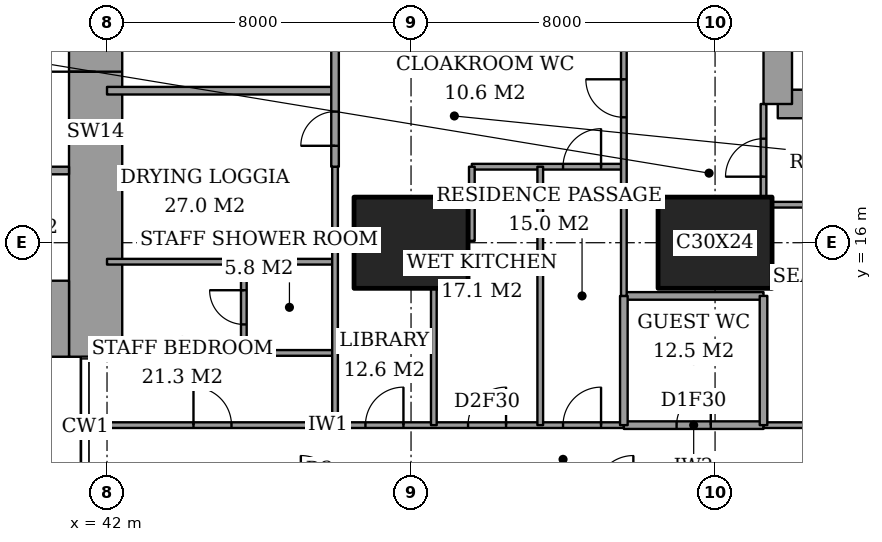
"""IFC4 building model, lengths in metres.
Left out: names, types, materials, properties, quantities, classifications, styles, units other than length and angle.
Written with IfcOpenShell. Run it as: python <this file> out.ifc"""

import sys

from ifc_helpers import new_model, si_unit, direction, frame, frame_2d, origin, origin_2d, place, context, subcontext, project, spatial, rectangle, extrude, element, fill, save


model = new_model("IFC4")
c1 = context("Model", 3, precision=1e-05, world=origin(), true_north=direction((0.0, 1.0)))
c2 = subcontext(c1, "Body", "Model", "MODEL_VIEW")
j1 = project(units=[si_unit("LENGTHUNIT", "METRE"), si_unit("PLANEANGLEUNIT", "RADIAN")], contexts=[c1])
p1 = place(None, origin())
s1 = spatial("IfcSite", under=j1, at=p1, CompositionType="ELEMENT")
p2 = place(p1, origin())
s2 = spatial("IfcBuilding", under=s1, at=p2, CompositionType="ELEMENT")
p3 = place(p2, frame((0.0, 0.0, 207.4)))
s3 = spatial("IfcBuildingStorey", under=s2, at=p3, CompositionType="ELEMENT", Elevation=207.4)
for number, where, z_axis, x_axis in (
    (1, (50.0, 16.0, 0.0), (0.0, 0.0, 1.0), (1.0, 0.0, 0.0)),
    (2, (58.0, 16.0, 0.0), (0.0, 0.0, 1.0), (1.0, 0.0, 0.0)),
):
    element("IfcColumn", number, at=place(p3, frame(where, z_axis=z_axis, x_axis=x_axis)), inside=s3, PredefinedType="COLUMN", context=c2, shape_type="SweptSolid", body=[
        extrude(rectangle(XDim=3.0, YDim=2.4, at=origin_2d()), origin(), (0.0, 0.0, 1.0), 3.6),
    ])
p4 = place(p3, frame((37.85, 14.0, 0.0), z_axis=(0.0, 0.0, 1.0), x_axis=(1.0, 0.0, 0.0)))
e3 = element("IfcWall", 3, at=p4, inside=s3, PredefinedType="SHEAR", context=c2, shape_type="SweptSolid", body=[
    extrude(rectangle(XDim=3.15, YDim=2.0, at=frame_2d((1.575, 0.0))), origin(), (0.0, 0.0, 1.0), 3.6),
])
p5 = place(p3, frame((41.7, 13.0, 0.0), z_axis=(0.0, 0.0, 1.0), x_axis=(0.0, 1.0, 0.0)))
e4 = element("IfcWall", 4, at=p5, inside=s3, PredefinedType="SHEAR", context=c2, shape_type="SweptSolid", body=[
    extrude(rectangle(XDim=11.85, YDim=1.4, at=frame_2d((5.925, 0.0))), origin(), (0.0, 0.0, 1.0), 3.6),
])
p6 = place(p5, frame((7.5, 0.0, 0.0)))
e5 = element("IfcOpeningElement", 5, at=p6, cuts=e4, PredefinedType="OPENING", context=c2, shape_type="SweptSolid", body=[
    extrude(rectangle(XDim=1.8, YDim=2.4, at=frame_2d((0.9, 1.2))), frame((0.0, 0.71, 0.0), z_axis=(0.0, -1.0, 0.0), x_axis=(1.0, 0.0, 0.0)), (0.0, 0.0, 1.0), 1.42),
])
p7 = place(p3, frame((59.65, 19.65, 0.0), z_axis=(0.0, 0.0, 1.0), x_axis=(1.0, 0.0, 0.0)))
e6 = element("IfcWall", 6, at=p7, inside=s3, PredefinedType="SHEAR", context=c2, shape_type="SweptSolid", body=[
    extrude(rectangle(XDim=4.45, YDim=0.75, at=frame_2d((2.225, 0.0))), origin(), (0.0, 0.0, 1.0), 3.6),
])
p8 = place(p3, frame((59.65, 28.35, 0.0), z_axis=(0.0, 0.0, 1.0), x_axis=(0.0, -1.0, 0.0)))
e7 = element("IfcWall", 7, at=p8, inside=s3, PredefinedType="SHEAR", context=c2, shape_type="SweptSolid", body=[
    extrude(rectangle(XDim=8.7, YDim=0.75, at=frame_2d((4.35, 0.0))), origin(), (0.0, 0.0, 1.0), 3.6),
])
p9 = place(p8, frame((0.975, 0.0, 0.0)))
e8 = element("IfcOpeningElement", 8, at=p9, cuts=e7, PredefinedType="OPENING", context=c2, shape_type="SweptSolid", body=[
    extrude(rectangle(XDim=1.0, YDim=2.1, at=frame_2d((0.5, 1.05))), frame((0.0, 0.385, 0.0), z_axis=(0.0, -1.0, 0.0), x_axis=(1.0, 0.0, 0.0)), (0.0, 0.0, 1.0), 0.77),
])
p10 = place(p3, frame((55.6, 11.2, 0.0), z_axis=(0.0, 0.0, 1.0), x_axis=(1.0, 0.0, 0.0)))
e9 = element("IfcWall", 9, at=p10, inside=s3, PredefinedType="PARTITIONING", context=c2, shape_type="SweptSolid", body=[
    extrude(rectangle(XDim=3.675, YDim=0.2, at=frame_2d((1.837, 0.0))), origin(), (0.0, 0.0, 1.0), 3.35),
])
p11 = place(p10, frame((1.387, 0.0, 0.0)))
e10 = element("IfcOpeningElement", 10, at=p11, cuts=e9, PredefinedType="OPENING", context=c2, shape_type="SweptSolid", body=[
    extrude(rectangle(XDim=0.9, YDim=2.1, at=frame_2d((0.45, 1.05))), frame((0.0, 0.11, 0.0), z_axis=(0.0, -1.0, 0.0), x_axis=(1.0, 0.0, 0.0)), (0.0, 0.0, 1.0), 0.22),
])
p12 = place(p3, frame((41.439, 11.2, 0.0), z_axis=(0.0, 0.0, 1.0), x_axis=(1.0, 0.0, 0.0)))
e11 = element("IfcWall", 11, at=p12, inside=s3, PredefinedType="PARTITIONING", context=c2, shape_type="SweptSolid", body=[
    extrude(rectangle(XDim=14.161, YDim=0.15, at=frame_2d((7.081, 0.0))), origin(), (0.0, 0.0, 1.0), 3.35),
])
p13 = place(p12, frame((12.561, 0.0, 0.0)))
e12 = element("IfcOpeningElement", 12, at=p13, cuts=e11, PredefinedType="OPENING", context=c2, shape_type="SweptSolid", body=[
    extrude(rectangle(XDim=1.0, YDim=2.1, at=frame_2d((0.5, 1.05))), frame((0.0, 0.085, 0.0), z_axis=(0.0, -1.0, 0.0), x_axis=(1.0, 0.0, 0.0)), (0.0, 0.0, 1.0), 0.17),
])
p14 = place(p12, frame((10.061, 0.0, 0.0)))
e13 = element("IfcOpeningElement", 13, at=p14, cuts=e11, PredefinedType="OPENING", context=c2, shape_type="SweptSolid", body=[
    extrude(rectangle(XDim=1.0, YDim=2.1, at=frame_2d((0.5, 1.05))), frame((0.0, 0.085, 0.0), z_axis=(0.0, -1.0, 0.0), x_axis=(1.0, 0.0, 0.0)), (0.0, 0.0, 1.0), 0.17),
])
p15 = place(p12, frame((7.361, 0.0, 0.0)))
e14 = element("IfcOpeningElement", 14, at=p15, cuts=e11, PredefinedType="OPENING", context=c2, shape_type="SweptSolid", body=[
    extrude(rectangle(XDim=1.0, YDim=2.1, at=frame_2d((0.5, 1.05))), frame((0.0, 0.085, 0.0), z_axis=(0.0, -1.0, 0.0), x_axis=(1.0, 0.0, 0.0)), (0.0, 0.0, 1.0), 0.17),
])
p16 = place(p12, frame((2.836, 0.0, 0.0)))
e15 = element("IfcOpeningElement", 15, at=p16, cuts=e11, PredefinedType="OPENING", context=c2, shape_type="SweptSolid", body=[
    extrude(rectangle(XDim=1.0, YDim=2.1, at=frame_2d((0.5, 1.05))), frame((0.0, 0.085, 0.0), z_axis=(0.0, -1.0, 0.0), x_axis=(1.0, 0.0, 0.0)), (0.0, 0.0, 1.0), 0.17),
])
p17 = place(p3, frame((59.275, 11.2, 0.0), z_axis=(0.0, 0.0, 1.0), x_axis=(1.0, 0.0, 0.0)))
e16 = element("IfcWall", 16, at=p17, inside=s3, PredefinedType="PARTITIONING", context=c2, shape_type="SweptSolid", body=[
    extrude(rectangle(XDim=7.175, YDim=0.15, at=frame_2d((3.587, 0.0))), origin(), (0.0, 0.0, 1.0), 3.35),
])
p18 = place(p17, frame((3.087, 0.0, 0.0)))
e17 = element("IfcOpeningElement", 17, at=p18, cuts=e16, PredefinedType="OPENING", context=c2, shape_type="SweptSolid", body=[
    extrude(rectangle(XDim=1.0, YDim=2.1, at=frame_2d((0.5, 1.05))), frame((0.0, 0.085, 0.0), z_axis=(0.0, -1.0, 0.0), x_axis=(1.0, 0.0, 0.0)), (0.0, 0.0, 1.0), 0.17),
])
p19 = place(p3, frame((45.6, 13.1, 0.0), z_axis=(0.0, 0.0, 1.0), x_axis=(1.0, 0.0, 0.0)))
e18 = element("IfcWall", 18, at=p19, inside=s3, PredefinedType="PARTITIONING", context=c2, shape_type="SweptSolid", body=[
    extrude(rectangle(XDim=2.4, YDim=0.15, at=frame_2d((1.2, 0.0))), origin(), (0.0, 0.0, 1.0), 3.35),
])
p20 = place(p3, frame((55.6, 14.6, 0.0), z_axis=(0.0, 0.0, 1.0), x_axis=(1.0, 0.0, 0.0)))
e19 = element("IfcWall", 19, at=p20, inside=s3, PredefinedType="PARTITIONING", context=c2, shape_type="SweptSolid", body=[
    extrude(rectangle(XDim=3.675, YDim=0.2, at=frame_2d((1.837, 0.0))), origin(), (0.0, 0.0, 1.0), 3.35),
])
p21 = place(p3, frame((42.0, 15.5, 0.0), z_axis=(0.0, 0.0, 1.0), x_axis=(1.0, 0.0, 0.0)))
e20 = element("IfcWall", 20, at=p21, inside=s3, PredefinedType="PARTITIONING", context=c2, shape_type="SweptSolid", body=[
    extrude(rectangle(XDim=6.0, YDim=0.15, at=frame_2d((3.0, 0.0))), origin(), (0.0, 0.0, 1.0), 3.35),
])
p22 = place(p3, frame((48.0, 16.05, 0.0), z_axis=(0.0, 0.0, 1.0), x_axis=(1.0, 0.0, 0.0)))
e21 = element("IfcWall", 21, at=p22, inside=s3, PredefinedType="PARTITIONING", context=c2, shape_type="SweptSolid", body=[
    extrude(rectangle(XDim=0.5, YDim=0.15, at=frame_2d((0.25, 0.0))), origin(), (0.0, 0.0, 1.0), 2.634),
])
p23 = place(p3, frame((59.5, 17.0, 0.0), z_axis=(0.0, 0.0, 1.0), x_axis=(1.0, 0.0, 0.0)))
e22 = element("IfcWall", 22, at=p23, inside=s3, PredefinedType="PARTITIONING", context=c2, shape_type="SweptSolid", body=[
    extrude(rectangle(XDim=6.95, YDim=0.15, at=frame_2d((3.475, 0.0))), origin(), (0.0, 0.0, 1.0), 3.35),
])
p24 = place(p3, frame((51.6, 18.0, 0.0), z_axis=(0.0, 0.0, 1.0), x_axis=(1.0, 0.0, 0.0)))
e23 = element("IfcWall", 23, at=p24, inside=s3, PredefinedType="PARTITIONING", context=c2, shape_type="SweptSolid", body=[
    extrude(rectangle(XDim=4.0, YDim=0.15, at=frame_2d((2.0, 0.0))), origin(), (0.0, 0.0, 1.0), 3.35),
])
p25 = place(p24, frame((2.4, 0.0, 0.0)))
e24 = element("IfcOpeningElement", 24, at=p25, cuts=e23, PredefinedType="OPENING", context=c2, shape_type="SweptSolid", body=[
    extrude(rectangle(XDim=1.0, YDim=2.1, at=frame_2d((0.5, 1.05))), frame((0.0, 0.085, 0.0), z_axis=(0.0, -1.0, 0.0), x_axis=(1.0, 0.0, 0.0)), (0.0, 0.0, 1.0), 0.17),
])
p26 = place(p3, frame((42.0, 20.0, 0.0), z_axis=(0.0, 0.0, 1.0), x_axis=(1.0, 0.0, 0.0)))
e25 = element("IfcWall", 25, at=p26, inside=s3, PredefinedType="PARTITIONING", context=c2, shape_type="SweptSolid", body=[
    extrude(rectangle(XDim=6.0, YDim=0.2, at=frame_2d((3.0, 0.0))), origin(), (0.0, 0.0, 1.0), 3.35),
])
p27 = place(p3, frame((45.6, 13.1, 0.0), z_axis=(0.0, 0.0, 1.0), x_axis=(0.0, 1.0, 0.0)))
e26 = element("IfcWall", 26, at=p27, inside=s3, PredefinedType="PARTITIONING", context=c2, shape_type="SweptSolid", body=[
    extrude(rectangle(XDim=2.4, YDim=0.15, at=frame_2d((1.2, 0.0))), origin(), (0.0, 0.0, 1.0), 3.35),
])
p28 = place(p27, frame((0.75, 0.0, 0.0)))
e27 = element("IfcOpeningElement", 27, at=p28, cuts=e26, PredefinedType="OPENING", context=c2, shape_type="SweptSolid", body=[
    extrude(rectangle(XDim=0.9, YDim=2.1, at=frame_2d((0.45, 1.05))), frame((0.0, 0.085, 0.0), z_axis=(0.0, -1.0, 0.0), x_axis=(1.0, 0.0, 0.0)), (0.0, 0.0, 1.0), 0.17),
])
p29 = place(p3, frame((48.0, 18.0, 0.0), z_axis=(0.0, 0.0, 1.0), x_axis=(0.0, 1.0, 0.0)))
e28 = element("IfcWall", 28, at=p29, inside=s3, PredefinedType="PARTITIONING", context=c2, shape_type="SweptSolid", body=[
    extrude(rectangle(XDim=6.0, YDim=0.2, at=frame_2d((3.0, 0.0))), origin(), (0.0, 0.0, 1.0), 3.35),
])
p30 = place(p29, frame((3.4, 0.0, 0.0)))
e29 = element("IfcOpeningElement", 29, at=p30, cuts=e28, PredefinedType="OPENING", context=c2, shape_type="SweptSolid", body=[
    extrude(rectangle(XDim=1.2, YDim=2.4, at=frame_2d((0.6, 1.2))), frame((0.0, 0.11, 0.0), z_axis=(0.0, -1.0, 0.0), x_axis=(1.0, 0.0, 0.0)), (0.0, 0.0, 1.0), 0.22),
])
p31 = place(p29, frame((0.55, 0.0, 0.0)))
e30 = element("IfcOpeningElement", 30, at=p31, cuts=e28, PredefinedType="OPENING", context=c2, shape_type="SweptSolid", body=[
    extrude(rectangle(XDim=0.9, YDim=2.1, at=frame_2d((0.45, 1.05))), frame((0.0, 0.11, 0.0), z_axis=(0.0, -1.0, 0.0), x_axis=(1.0, 0.0, 0.0)), (0.0, 0.0, 1.0), 0.22),
])
p32 = place(p3, frame((48.0, 11.2, 0.0), z_axis=(0.0, 0.0, 1.0), x_axis=(0.0, 1.0, 0.0)))
e31 = element("IfcWall", 31, at=p32, inside=s3, PredefinedType="PARTITIONING", context=c2, shape_type="SweptSolid", body=[
    extrude(rectangle(XDim=6.8, YDim=0.15, at=frame_2d((3.4, 0.0))), origin(), (0.0, 0.0, 1.0), 3.35),
])
p33 = place(p3, frame((50.6, 11.2, 0.0), z_axis=(0.0, 0.0, 1.0), x_axis=(0.0, 1.0, 0.0)))
e32 = element("IfcWall", 32, at=p33, inside=s3, PredefinedType="PARTITIONING", context=c2, shape_type="SweptSolid", body=[
    extrude(rectangle(XDim=3.6, YDim=0.15, at=frame_2d((1.8, 0.0))), origin(), (0.0, 0.0, 1.0), 3.35),
])
p34 = place(p3, frame((51.6, 16.05, 0.0), z_axis=(0.0, 0.0, 1.0), x_axis=(0.0, 1.0, 0.0)))
e33 = element("IfcWall", 33, at=p34, inside=s3, PredefinedType="PARTITIONING", context=c2, shape_type="SweptSolid", body=[
    extrude(rectangle(XDim=1.95, YDim=0.15, at=frame_2d((0.975, 0.0))), origin(), (0.0, 0.0, 1.0), 3.35),
])
p35 = place(p3, frame((53.4, 11.2, 0.0), z_axis=(0.0, 0.0, 1.0), x_axis=(0.0, 1.0, 0.0)))
e34 = element("IfcWall", 34, at=p35, inside=s3, PredefinedType="PARTITIONING", context=c2, shape_type="SweptSolid", body=[
    extrude(rectangle(XDim=6.8, YDim=0.15, at=frame_2d((3.4, 0.0))), origin(), (0.0, 0.0, 1.0), 3.35),
])
p36 = place(p3, frame((55.6, 11.2, 0.0), z_axis=(0.0, 0.0, 1.0), x_axis=(0.0, 1.0, 0.0)))
e35 = element("IfcWall", 35, at=p36, inside=s3, PredefinedType="PARTITIONING", context=c2, shape_type="SweptSolid", body=[
    extrude(rectangle(XDim=3.4, YDim=0.2, at=frame_2d((1.7, 0.0))), origin(), (0.0, 0.0, 1.0), 3.35),
])
p37 = place(p3, frame((55.6, 14.6, 0.0), z_axis=(0.0, 0.0, 1.0), x_axis=(0.0, 1.0, 0.0)))
e36 = element("IfcWall", 36, at=p37, inside=s3, PredefinedType="PARTITIONING", context=c2, shape_type="SweptSolid", body=[
    extrude(rectangle(XDim=7.0, YDim=0.15, at=frame_2d((3.5, 0.0))), origin(), (0.0, 0.0, 1.0), 3.35),
])
p38 = place(p37, frame((4.7, 0.0, 0.0)))
e37 = element("IfcOpeningElement", 37, at=p38, cuts=e36, PredefinedType="OPENING", context=c2, shape_type="SweptSolid", body=[
    extrude(rectangle(XDim=1.0, YDim=2.1, at=frame_2d((0.5, 1.05))), frame((0.0, 0.085, 0.0), z_axis=(0.0, -1.0, 0.0), x_axis=(1.0, 0.0, 0.0)), (0.0, 0.0, 1.0), 0.17),
])
p39 = place(p3, frame((59.275, 11.2, 0.0), z_axis=(0.0, 0.0, 1.0), x_axis=(0.0, 1.0, 0.0)))
e38 = element("IfcWall", 38, at=p39, inside=s3, PredefinedType="PARTITIONING", context=c2, shape_type="SweptSolid", body=[
    extrude(rectangle(XDim=3.4, YDim=0.2, at=frame_2d((1.7, 0.0))), origin(), (0.0, 0.0, 1.0), 3.35),
])
p40 = place(p3, frame((59.275, 17.2, 0.0), z_axis=(0.0, 0.0, 1.0), x_axis=(0.0, 1.0, 0.0)))
e39 = element("IfcWall", 39, at=p40, inside=s3, PredefinedType="PARTITIONING", context=c2, shape_type="SweptSolid", body=[
    extrude(rectangle(XDim=2.45, YDim=0.15, at=frame_2d((1.225, 0.0))), origin(), (0.0, 0.0, 1.0), 3.35),
])
p41 = place(p40, frame((0.538, 0.0, 0.0)))
e40 = element("IfcOpeningElement", 40, at=p41, cuts=e39, PredefinedType="OPENING", context=c2, shape_type="SweptSolid", body=[
    extrude(rectangle(XDim=1.0, YDim=2.1, at=frame_2d((0.5, 1.05))), frame((0.0, 0.085, 0.0), z_axis=(0.0, -1.0, 0.0), x_axis=(1.0, 0.0, 0.0)), (0.0, 0.0, 1.0), 0.17),
])
p42 = place(p3, frame((28.3, 17.9, 0.0), z_axis=(0.0, 0.0, 1.0), x_axis=(1.0, 0.0, 0.0)))
e41 = element("IfcWall", 41, at=p42, inside=s3, PredefinedType="PARTITIONING", context=c2, shape_type="SweptSolid", body=[
    extrude(rectangle(XDim=12.7, YDim=0.2, at=frame_2d((6.35, 0.0))), origin(), (0.0, 0.0, 1.0), 3.6),
])
p43 = place(p42, frame((1.05, 0.0, 0.0)))
e42 = element("IfcOpeningElement", 42, at=p43, cuts=e41, PredefinedType="OPENING", context=c2, shape_type="SweptSolid", body=[
    extrude(rectangle(XDim=0.9, YDim=2.1, at=frame_2d((0.45, 1.05))), frame((0.0, 0.11, 0.0), z_axis=(0.0, -1.0, 0.0), x_axis=(1.0, 0.0, 0.0)), (0.0, 0.0, 1.0), 0.22),
])
p44 = place(p42, frame((4.25, 0.0, 0.0)))
e43 = element("IfcOpeningElement", 43, at=p44, cuts=e41, PredefinedType="OPENING", context=c2, shape_type="SweptSolid", body=[
    extrude(rectangle(XDim=0.9, YDim=2.1, at=frame_2d((0.45, 1.05))), frame((0.0, 0.11, 0.0), z_axis=(0.0, -1.0, 0.0), x_axis=(1.0, 0.0, 0.0)), (0.0, 0.0, 1.0), 0.22),
])
p45 = place(p42, frame((10.6, 0.0, 0.0)))
e44 = element("IfcOpeningElement", 44, at=p45, cuts=e41, PredefinedType="OPENING", context=c2, shape_type="SweptSolid", body=[
    extrude(rectangle(XDim=1.2, YDim=2.1, at=frame_2d((0.6, 1.05))), frame((0.0, 0.11, 0.0), z_axis=(0.0, -1.0, 0.0), x_axis=(1.0, 0.0, 0.0)), (0.0, 0.0, 1.0), 0.22),
])
p46 = place(p13, origin())
e45 = element("IfcDoor", 45, at=p46, inside=s3, OperationType="SINGLE_SWING_LEFT", PredefinedType="DOOR", context=c2, shape_type="SweptSolid", body=[
    extrude(rectangle(XDim=1.0, YDim=2.1, at=frame_2d((0.5, 1.05))), frame((0.0, 0.025, 0.0), z_axis=(0.0, -1.0, 0.0), x_axis=(1.0, 0.0, 0.0)), (0.0, 0.0, 1.0), 0.05),
])
fill(e12, e45)
p47 = place(p41, origin())
e46 = element("IfcDoor", 46, at=p47, inside=s3, OperationType="SINGLE_SWING_RIGHT", PredefinedType="DOOR", context=c2, shape_type="SweptSolid", body=[
    extrude(rectangle(XDim=1.0, YDim=2.1, at=frame_2d((0.5, 1.05))), frame((0.0, 0.025, 0.0), z_axis=(0.0, -1.0, 0.0), x_axis=(1.0, 0.0, 0.0)), (0.0, 0.0, 1.0), 0.05),
])
fill(e40, e46)
p48 = place(p11, origin())
e47 = element("IfcDoor", 47, at=p48, inside=s3, OperationType="SINGLE_SWING_LEFT", PredefinedType="DOOR", context=c2, shape_type="SweptSolid", body=[
    extrude(rectangle(XDim=0.9, YDim=2.1, at=frame_2d((0.45, 1.05))), frame((0.0, 0.025, 0.0), z_axis=(0.0, -1.0, 0.0), x_axis=(1.0, 0.0, 0.0)), (0.0, 0.0, 1.0), 0.05),
])
fill(e10, e47)
p49 = place(p38, origin())
e48 = element("IfcDoor", 48, at=p49, inside=s3, OperationType="SINGLE_SWING_LEFT", PredefinedType="DOOR", context=c2, shape_type="SweptSolid", body=[
    extrude(rectangle(XDim=1.0, YDim=2.1, at=frame_2d((0.5, 1.05))), frame((0.0, 0.025, 0.0), z_axis=(0.0, -1.0, 0.0), x_axis=(1.0, 0.0, 0.0)), (0.0, 0.0, 1.0), 0.05),
])
fill(e37, e48)
p50 = place(p25, origin())
e49 = element("IfcDoor", 49, at=p50, inside=s3, OperationType="SINGLE_SWING_LEFT", PredefinedType="DOOR", context=c2, shape_type="SweptSolid", body=[
    extrude(rectangle(XDim=1.0, YDim=2.1, at=frame_2d((0.5, 1.05))), frame((0.0, 0.025, 0.0), z_axis=(0.0, -1.0, 0.0), x_axis=(1.0, 0.0, 0.0)), (0.0, 0.0, 1.0), 0.05),
])
fill(e24, e49)
p51 = place(p14, origin())
e50 = element("IfcDoor", 50, at=p51, inside=s3, OperationType="SINGLE_SWING_LEFT", PredefinedType="DOOR", context=c2, shape_type="SweptSolid", body=[
    extrude(rectangle(XDim=1.0, YDim=2.1, at=frame_2d((0.5, 1.05))), frame((0.0, 0.025, 0.0), z_axis=(0.0, -1.0, 0.0), x_axis=(1.0, 0.0, 0.0)), (0.0, 0.0, 1.0), 0.05),
])
fill(e13, e50)
p52 = place(p15, origin())
e51 = element("IfcDoor", 51, at=p52, inside=s3, OperationType="SINGLE_SWING_LEFT", PredefinedType="DOOR", context=c2, shape_type="SweptSolid", body=[
    extrude(rectangle(XDim=1.0, YDim=2.1, at=frame_2d((0.5, 1.05))), frame((0.0, 0.025, 0.0), z_axis=(0.0, -1.0, 0.0), x_axis=(1.0, 0.0, 0.0)), (0.0, 0.0, 1.0), 0.05),
])
fill(e14, e51)
p53 = place(p28, origin())
e52 = element("IfcDoor", 52, at=p53, inside=s3, OperationType="SINGLE_SWING_LEFT", PredefinedType="DOOR", context=c2, shape_type="SweptSolid", body=[
    extrude(rectangle(XDim=0.9, YDim=2.1, at=frame_2d((0.45, 1.05))), frame((0.0, 0.025, 0.0), z_axis=(0.0, -1.0, 0.0), x_axis=(1.0, 0.0, 0.0)), (0.0, 0.0, 1.0), 0.05),
])
fill(e27, e52)
p54 = place(p16, origin())
e53 = element("IfcDoor", 53, at=p54, inside=s3, OperationType="SINGLE_SWING_RIGHT", PredefinedType="DOOR", context=c2, shape_type="SweptSolid", body=[
    extrude(rectangle(XDim=1.0, YDim=2.1, at=frame_2d((0.5, 1.05))), frame((0.0, 0.025, 0.0), z_axis=(0.0, -1.0, 0.0), x_axis=(1.0, 0.0, 0.0)), (0.0, 0.0, 1.0), 0.05),
])
fill(e15, e53)
p55 = place(p31, origin())
e54 = element("IfcDoor", 54, at=p55, inside=s3, OperationType="SINGLE_SWING_RIGHT", PredefinedType="DOOR", context=c2, shape_type="SweptSolid", body=[
    extrude(rectangle(XDim=0.9, YDim=2.1, at=frame_2d((0.45, 1.05))), frame((0.0, 0.025, 0.0), z_axis=(0.0, -1.0, 0.0), x_axis=(1.0, 0.0, 0.0)), (0.0, 0.0, 1.0), 0.05),
])
fill(e30, e54)
p56 = place(p6, origin())
e55 = element("IfcDoor", 55, at=p56, inside=s3, OperationType="DOUBLE_DOOR_DOUBLE_SWING", PredefinedType="DOOR", context=c2, shape_type="SweptSolid", body=[
    extrude(rectangle(XDim=1.8, YDim=2.4, at=frame_2d((0.9, 1.2))), frame((0.0, 0.025, 0.0), z_axis=(0.0, -1.0, 0.0), x_axis=(1.0, 0.0, 0.0)), (0.0, 0.0, 1.0), 0.05),
])
fill(e5, e55)
save(model, sys.argv[1])
